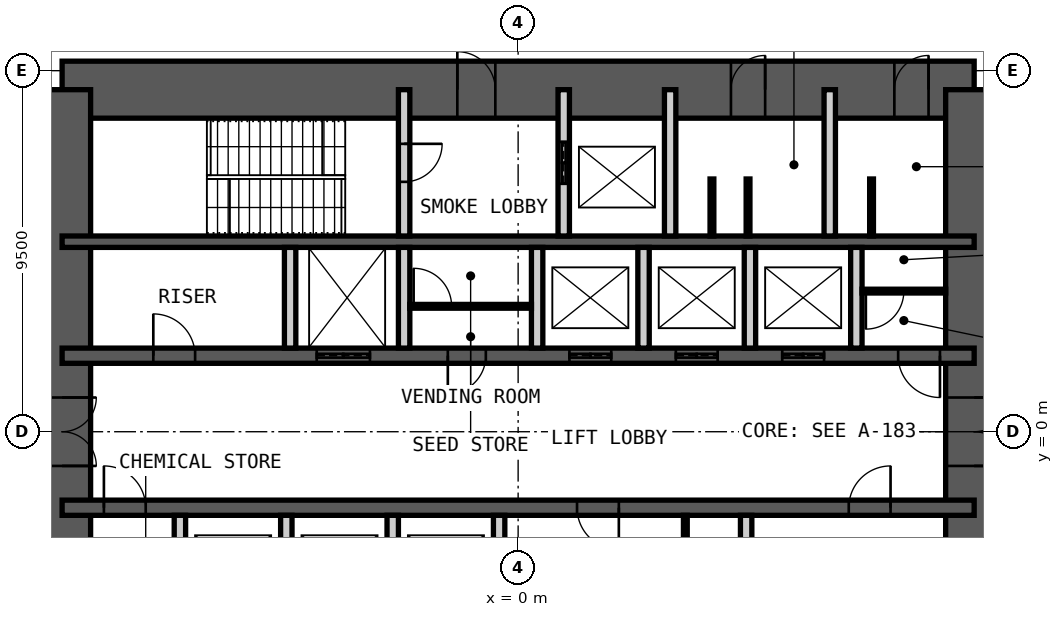
"""IFC4 building model, lengths in metres.
Left out: names, types, materials, properties, quantities, classifications, styles, units other than length and angle.
Written with IfcOpenShell. Run it as: python <this file> out.ifc"""

import sys

from ifc_helpers import new_model, si_unit, direction, frame, frame_2d, origin, place, context, subcontext, project, spatial, rectangle, extrude, element, fill, save


model = new_model("IFC4")
c1 = context("Model", 3, precision=1e-05, world=origin(), true_north=direction((0.0, 1.0)))
c2 = subcontext(c1, "Body", "Model", "MODEL_VIEW")
j1 = project(units=[si_unit("LENGTHUNIT", "METRE"), si_unit("PLANEANGLEUNIT", "RADIAN")], contexts=[c1])
p1 = place(None, origin())
s1 = spatial("IfcSite", under=j1, at=p1, CompositionType="ELEMENT")
p2 = place(p1, origin())
s2 = spatial("IfcBuilding", under=s1, at=p2, CompositionType="ELEMENT")
p3 = place(p2, frame((0.0, 0.0, 57.0)))
s3 = spatial("IfcBuildingStorey", under=s2, at=p3, CompositionType="ELEMENT", Elevation=57.0)
p4 = place(p3, frame((-12.0, 9.0, 0.0), z_axis=(0.0, 0.0, 1.0), x_axis=(1.0, 0.0, 0.0)))
e1 = element("IfcWall", 1, at=p4, inside=s3, PredefinedType="SHEAR", context=c2, shape_type="SweptSolid", body=[
    extrude(rectangle(XDim=24.0, YDim=1.5, at=frame_2d((12.0, 0.0))), origin(), (0.0, 0.0, 1.0), 5.0),
])
p5 = place(p4, frame((10.4, 0.0, 0.0)))
e2 = element("IfcOpeningElement", 2, at=p5, cuts=e1, PredefinedType="OPENING", context=c2, shape_type="SweptSolid", body=[
    extrude(rectangle(XDim=1.0, YDim=2.1, at=frame_2d((0.5, 1.05))), frame((0.0, 0.76, 0.0), z_axis=(0.0, -1.0, 0.0), x_axis=(1.0, 0.0, 0.0)), (0.0, 0.0, 1.0), 1.52),
])
p6 = place(p4, frame((17.6, 0.0, 0.0)))
e3 = element("IfcOpeningElement", 3, at=p6, cuts=e1, PredefinedType="OPENING", context=c2, shape_type="SweptSolid", body=[
    extrude(rectangle(XDim=0.9, YDim=2.1, at=frame_2d((0.45, 1.05))), frame((0.0, 0.76, 0.0), z_axis=(0.0, -1.0, 0.0), x_axis=(1.0, 0.0, 0.0)), (0.0, 0.0, 1.0), 1.52),
])
p7 = place(p4, frame((21.9, 0.0, 0.0)))
e4 = element("IfcOpeningElement", 4, at=p7, cuts=e1, PredefinedType="OPENING", context=c2, shape_type="SweptSolid", body=[
    extrude(rectangle(XDim=0.9, YDim=2.1, at=frame_2d((0.45, 1.05))), frame((0.0, 0.76, 0.0), z_axis=(0.0, -1.0, 0.0), x_axis=(1.0, 0.0, 0.0)), (0.0, 0.0, 1.0), 1.52),
])
p8 = place(p3, frame((12.0, -9.0, 0.0), z_axis=(0.0, 0.0, 1.0), x_axis=(0.0, 1.0, 0.0)))
e5 = element("IfcWall", 5, at=p8, inside=s3, PredefinedType="SHEAR", context=c2, shape_type="SweptSolid", body=[
    extrude(rectangle(XDim=18.0, YDim=1.5, at=frame_2d((9.0, 0.0))), origin(), (0.0, 0.0, 1.0), 5.0),
])
p9 = place(p8, frame((8.1, 0.0, 0.0)))
e6 = element("IfcOpeningElement", 6, at=p9, cuts=e5, PredefinedType="OPENING", context=c2, shape_type="SweptSolid", body=[
    extrude(rectangle(XDim=1.8, YDim=2.1, at=frame_2d((0.9, 1.05))), frame((0.0, 0.76, 0.0), z_axis=(0.0, -1.0, 0.0), x_axis=(1.0, 0.0, 0.0)), (0.0, 0.0, 1.0), 1.52),
])
p10 = place(p3, frame((-12.0, -9.0, 0.0), z_axis=(0.0, 0.0, 1.0), x_axis=(0.0, 1.0, 0.0)))
e7 = element("IfcWall", 7, at=p10, inside=s3, PredefinedType="SHEAR", context=c2, shape_type="SweptSolid", body=[
    extrude(rectangle(XDim=18.0, YDim=1.5, at=frame_2d((9.0, 0.0))), origin(), (0.0, 0.0, 1.0), 5.0),
])
p11 = place(p10, frame((8.1, 0.0, 0.0)))
e8 = element("IfcOpeningElement", 8, at=p11, cuts=e7, PredefinedType="OPENING", context=c2, shape_type="SweptSolid", body=[
    extrude(rectangle(XDim=1.8, YDim=2.1, at=frame_2d((0.9, 1.05))), frame((0.0, 0.76, 0.0), z_axis=(0.0, -1.0, 0.0), x_axis=(1.0, 0.0, 0.0)), (0.0, 0.0, 1.0), 1.52),
])
p12 = place(p3, frame((-12.0, 5.0, 0.0), z_axis=(0.0, 0.0, 1.0), x_axis=(1.0, 0.0, 0.0)))
e9 = element("IfcWall", 9, at=p12, inside=s3, PredefinedType="SHEAR", context=c2, shape_type="SweptSolid", body=[
    extrude(rectangle(XDim=24.0, YDim=0.3, at=frame_2d((12.0, 0.0))), origin(), (0.0, 0.0, 1.0), 5.0),
])
p13 = place(p3, frame((-12.0, 2.0, 0.0), z_axis=(0.0, 0.0, 1.0), x_axis=(1.0, 0.0, 0.0)))
e10 = element("IfcWall", 10, at=p13, inside=s3, PredefinedType="SHEAR", context=c2, shape_type="SweptSolid", body=[
    extrude(rectangle(XDim=24.0, YDim=0.4, at=frame_2d((12.0, 0.0))), origin(), (0.0, 0.0, 1.0), 5.0),
])
p14 = place(p13, frame((2.4, 0.0, 0.0)))
e11 = element("IfcOpeningElement", 11, at=p14, cuts=e10, PredefinedType="OPENING", context=c2, shape_type="SweptSolid", body=[
    extrude(rectangle(XDim=1.1, YDim=2.1, at=frame_2d((0.55, 1.05))), frame((0.0, 0.21, 0.0), z_axis=(0.0, -1.0, 0.0), x_axis=(1.0, 0.0, 0.0)), (0.0, 0.0, 1.0), 0.42),
])
p15 = place(p13, frame((22.0, 0.0, 0.0)))
e12 = element("IfcOpeningElement", 12, at=p15, cuts=e10, PredefinedType="OPENING", context=c2, shape_type="SweptSolid", body=[
    extrude(rectangle(XDim=1.1, YDim=2.1, at=frame_2d((0.55, 1.05))), frame((0.0, 0.21, 0.0), z_axis=(0.0, -1.0, 0.0), x_axis=(1.0, 0.0, 0.0)), (0.0, 0.0, 1.0), 0.42),
])
p16 = place(p13, frame((10.15, 0.0, 0.0)))
e13 = element("IfcOpeningElement", 13, at=p16, cuts=e10, PredefinedType="OPENING", context=c2, shape_type="SweptSolid", body=[
    extrude(rectangle(XDim=1.0, YDim=2.1, at=frame_2d((0.5, 1.05))), frame((0.0, 0.21, 0.0), z_axis=(0.0, -1.0, 0.0), x_axis=(1.0, 0.0, 0.0)), (0.0, 0.0, 1.0), 0.42),
])
p17 = place(p13, frame((6.7, 0.0, 0.0)))
e14 = element("IfcOpeningElement", 14, at=p17, cuts=e10, PredefinedType="OPENING", context=c2, shape_type="SweptSolid", body=[
    extrude(rectangle(XDim=1.4, YDim=2.4, at=frame_2d((0.7, 1.2))), frame((0.0, 0.21, 0.0), z_axis=(0.0, -1.0, 0.0), x_axis=(1.0, 0.0, 0.0)), (0.0, 0.0, 1.0), 0.42),
])
p18 = place(p13, frame((13.35, 0.0, 0.0)))
e15 = element("IfcOpeningElement", 15, at=p18, cuts=e10, PredefinedType="OPENING", context=c2, shape_type="SweptSolid", body=[
    extrude(rectangle(XDim=1.1, YDim=2.4, at=frame_2d((0.55, 1.2))), frame((0.0, 0.21, 0.0), z_axis=(0.0, -1.0, 0.0), x_axis=(1.0, 0.0, 0.0)), (0.0, 0.0, 1.0), 0.42),
])
p19 = place(p13, frame((16.15, 0.0, 0.0)))
e16 = element("IfcOpeningElement", 16, at=p19, cuts=e10, PredefinedType="OPENING", context=c2, shape_type="SweptSolid", body=[
    extrude(rectangle(XDim=1.1, YDim=2.4, at=frame_2d((0.55, 1.2))), frame((0.0, 0.21, 0.0), z_axis=(0.0, -1.0, 0.0), x_axis=(1.0, 0.0, 0.0)), (0.0, 0.0, 1.0), 0.42),
])
p20 = place(p13, frame((18.95, 0.0, 0.0)))
e17 = element("IfcOpeningElement", 17, at=p20, cuts=e10, PredefinedType="OPENING", context=c2, shape_type="SweptSolid", body=[
    extrude(rectangle(XDim=1.1, YDim=2.4, at=frame_2d((0.55, 1.2))), frame((0.0, 0.21, 0.0), z_axis=(0.0, -1.0, 0.0), x_axis=(1.0, 0.0, 0.0)), (0.0, 0.0, 1.0), 0.42),
])
p21 = place(p3, frame((-12.0, -2.0, 0.0), z_axis=(0.0, 0.0, 1.0), x_axis=(1.0, 0.0, 0.0)))
e18 = element("IfcWall", 18, at=p21, inside=s3, PredefinedType="SHEAR", context=c2, shape_type="SweptSolid", body=[
    extrude(rectangle(XDim=24.0, YDim=0.4, at=frame_2d((12.0, 0.0))), origin(), (0.0, 0.0, 1.0), 5.0),
])
p22 = place(p21, frame((1.1, 0.0, 0.0)))
e19 = element("IfcOpeningElement", 19, at=p22, cuts=e18, PredefinedType="OPENING", context=c2, shape_type="SweptSolid", body=[
    extrude(rectangle(XDim=1.1, YDim=2.1, at=frame_2d((0.55, 1.05))), frame((0.0, 0.21, 0.0), z_axis=(0.0, -1.0, 0.0), x_axis=(1.0, 0.0, 0.0)), (0.0, 0.0, 1.0), 0.42),
])
p23 = place(p21, frame((13.55, 0.0, 0.0)))
e20 = element("IfcOpeningElement", 20, at=p23, cuts=e18, PredefinedType="OPENING", context=c2, shape_type="SweptSolid", body=[
    extrude(rectangle(XDim=1.1, YDim=2.1, at=frame_2d((0.55, 1.05))), frame((0.0, 0.21, 0.0), z_axis=(0.0, -1.0, 0.0), x_axis=(1.0, 0.0, 0.0)), (0.0, 0.0, 1.0), 0.42),
])
p24 = place(p21, frame((20.7, 0.0, 0.0)))
e21 = element("IfcOpeningElement", 21, at=p24, cuts=e18, PredefinedType="OPENING", context=c2, shape_type="SweptSolid", body=[
    extrude(rectangle(XDim=1.1, YDim=2.1, at=frame_2d((0.55, 1.05))), frame((0.0, 0.21, 0.0), z_axis=(0.0, -1.0, 0.0), x_axis=(1.0, 0.0, 0.0)), (0.0, 0.0, 1.0), 0.42),
])
p25 = place(p3, frame((-3.0, 5.15, 0.0), z_axis=(0.0, 0.0, 1.0), x_axis=(0.0, 1.0, 0.0)))
e22 = element("IfcWall", 22, at=p25, inside=s3, PredefinedType="PARTITIONING", context=c2, shape_type="SweptSolid", body=[
    extrude(rectangle(XDim=3.85, YDim=0.3, at=frame_2d((1.925, 0.0))), origin(), (0.0, 0.0, 1.0), 4.78),
])
p26 = place(p25, frame((1.425, 0.0, 0.0)))
e23 = element("IfcOpeningElement", 23, at=p26, cuts=e22, PredefinedType="OPENING", context=c2, shape_type="SweptSolid", body=[
    extrude(rectangle(XDim=1.0, YDim=2.1, at=frame_2d((0.5, 1.05))), frame((0.0, 0.16, 0.0), z_axis=(0.0, -1.0, 0.0), x_axis=(1.0, 0.0, 0.0)), (0.0, 0.0, 1.0), 0.32),
])
p27 = place(p3, frame((1.2, 5.15, 0.0), z_axis=(0.0, 0.0, 1.0), x_axis=(0.0, 1.0, 0.0)))
e24 = element("IfcWall", 24, at=p27, inside=s3, PredefinedType="PARTITIONING", context=c2, shape_type="SweptSolid", body=[
    extrude(rectangle(XDim=3.85, YDim=0.3, at=frame_2d((1.925, 0.0))), origin(), (0.0, 0.0, 1.0), 4.78),
])
p28 = place(p27, frame((1.375, 0.0, 0.0)))
e25 = element("IfcOpeningElement", 25, at=p28, cuts=e24, PredefinedType="OPENING", context=c2, shape_type="SweptSolid", body=[
    extrude(rectangle(XDim=1.1, YDim=2.4, at=frame_2d((0.55, 1.2))), frame((0.0, 0.16, 0.0), z_axis=(0.0, -1.0, 0.0), x_axis=(1.0, 0.0, 0.0)), (0.0, 0.0, 1.0), 0.32),
])
for number, where, z_axis, x_axis in (
    (26, (4.0, 5.15, 0.0), (0.0, 0.0, 1.0), (0.0, 1.0, 0.0)),
    (27, (8.2, 5.15, 0.0), (0.0, 0.0, 1.0), (0.0, 1.0, 0.0)),
):
    element("IfcWall", number, at=place(p3, frame(where, z_axis=z_axis, x_axis=x_axis)), inside=s3, PredefinedType="PARTITIONING", context=c2, shape_type="SweptSolid", body=[
        extrude(rectangle(XDim=3.85, YDim=0.3, at=frame_2d((1.925, 0.0))), origin(), (0.0, 0.0, 1.0), 4.78),
    ])
for number, where, z_axis, x_axis in (
    (28, (-6.0, 2.2, 0.0), (0.0, 0.0, 1.0), (0.0, 1.0, 0.0)),
    (29, (-3.0, 2.2, 0.0), (0.0, 0.0, 1.0), (0.0, 1.0, 0.0)),
    (30, (0.5, 2.2, 0.0), (0.0, 0.0, 1.0), (0.0, 1.0, 0.0)),
    (31, (3.3, 2.2, 0.0), (0.0, 0.0, 1.0), (0.0, 1.0, 0.0)),
    (32, (6.1, 2.2, 0.0), (0.0, 0.0, 1.0), (0.0, 1.0, 0.0)),
    (33, (8.9, 2.2, 0.0), (0.0, 0.0, 1.0), (0.0, 1.0, 0.0)),
    (34, (-8.9, -4.85, 0.0), (0.0, 0.0, 1.0), (0.0, 1.0, 0.0)),
    (35, (-6.1, -4.85, 0.0), (0.0, 0.0, 1.0), (0.0, 1.0, 0.0)),
    (36, (-3.3, -4.85, 0.0), (0.0, 0.0, 1.0), (0.0, 1.0, 0.0)),
    (37, (-0.5, -4.85, 0.0), (0.0, 0.0, 1.0), (0.0, 1.0, 0.0)),
    (38, (6.0, -4.85, 0.0), (0.0, 0.0, 1.0), (0.0, 1.0, 0.0)),
):
    element("IfcWall", number, at=place(p3, frame(where, z_axis=z_axis, x_axis=x_axis)), inside=s3, PredefinedType="PARTITIONING", context=c2, shape_type="SweptSolid", body=[
        extrude(rectangle(XDim=2.65, YDim=0.3, at=frame_2d((1.325, 0.0))), origin(), (0.0, 0.0, 1.0), 4.78),
    ])
p29 = place(p3, frame((-2.85, 3.3, 0.0), z_axis=(0.0, 0.0, 1.0), x_axis=(1.0, 0.0, 0.0)))
e39 = element("IfcWall", 39, at=p29, inside=s3, PredefinedType="PARTITIONING", context=c2, shape_type="SweptSolid", body=[
    extrude(rectangle(XDim=3.2, YDim=0.1, at=frame_2d((1.6, 0.0))), origin(), (0.0, 0.0, 1.0), 4.78),
])
p30 = place(p29, frame((0.1, 0.0, 0.0)))
e40 = element("IfcOpeningElement", 40, at=p30, cuts=e39, PredefinedType="OPENING", context=c2, shape_type="SweptSolid", body=[
    extrude(rectangle(XDim=1.0, YDim=2.4, at=frame_2d((0.5, 1.2))), frame((0.0, 0.06, 0.0), z_axis=(0.0, -1.0, 0.0), x_axis=(1.0, 0.0, 0.0)), (0.0, 0.0, 1.0), 0.12),
])
p31 = place(p3, frame((4.4, -4.85, 0.0), z_axis=(0.0, 0.0, 1.0), x_axis=(0.0, 1.0, 0.0)))
e41 = element("IfcWall", 41, at=p31, inside=s3, PredefinedType="PARTITIONING", context=c2, shape_type="SweptSolid", body=[
    extrude(rectangle(XDim=2.65, YDim=0.1, at=frame_2d((1.325, 0.0))), origin(), (0.0, 0.0, 1.0), 4.78),
])
p32 = place(p31, frame((0.1, 0.0, 0.0)))
e42 = element("IfcOpeningElement", 42, at=p32, cuts=e41, PredefinedType="OPENING", context=c2, shape_type="SweptSolid", body=[
    extrude(rectangle(XDim=1.0, YDim=2.4, at=frame_2d((0.5, 1.2))), frame((0.0, 0.06, 0.0), z_axis=(0.0, -1.0, 0.0), x_axis=(1.0, 0.0, 0.0)), (0.0, 0.0, 1.0), 0.12),
])
p33 = place(p3, frame((9.05, 3.7, 0.0), z_axis=(0.0, 0.0, 1.0), x_axis=(1.0, 0.0, 0.0)))
e43 = element("IfcWall", 43, at=p33, inside=s3, PredefinedType="PARTITIONING", context=c2, shape_type="SweptSolid", body=[
    extrude(rectangle(XDim=2.2, YDim=0.1, at=frame_2d((1.1, 0.0))), origin(), (0.0, 0.0, 1.0), 4.78),
])
p34 = place(p33, frame((0.1, 0.0, 0.0)))
e44 = element("IfcOpeningElement", 44, at=p34, cuts=e43, PredefinedType="OPENING", context=c2, shape_type="SweptSolid", body=[
    extrude(rectangle(XDim=1.0, YDim=2.4, at=frame_2d((0.5, 1.2))), frame((0.0, 0.06, 0.0), z_axis=(0.0, -1.0, 0.0), x_axis=(1.0, 0.0, 0.0)), (0.0, 0.0, 1.0), 0.12),
])
for number, where, z_axis, x_axis in (
    (45, (5.1, 5.15, 0.0), (0.0, 0.0, 1.0), (0.0, 1.0, 0.0)),
    (46, (6.05, 5.15, 0.0), (0.0, 0.0, 1.0), (0.0, 1.0, 0.0)),
    (47, (9.3, 5.15, 0.0), (0.0, 0.0, 1.0), (0.0, 1.0, 0.0)),
):
    element("IfcWall", number, at=place(p3, frame(where, z_axis=z_axis, x_axis=x_axis)), inside=s3, PredefinedType="PARTITIONING", context=c2, shape_type="SweptSolid", body=[
        extrude(rectangle(XDim=1.5, YDim=0.1, at=frame_2d((0.75, 0.0))), origin(), (0.0, 0.0, 1.0), 2.1),
    ])
p35 = place(p5, origin())
e48 = element("IfcDoor", 48, at=p35, inside=s3, OperationType="SINGLE_SWING_RIGHT", PredefinedType="DOOR", context=c2, shape_type="SweptSolid", body=[
    extrude(rectangle(XDim=1.0, YDim=2.1, at=frame_2d((0.5, 1.05))), frame((0.0, 0.025, 0.0), z_axis=(0.0, -1.0, 0.0), x_axis=(1.0, 0.0, 0.0)), (0.0, 0.0, 1.0), 0.05),
])
fill(e2, e48)
p36 = place(p6, origin())
e49 = element("IfcDoor", 49, at=p36, inside=s3, OperationType="SINGLE_SWING_LEFT", PredefinedType="DOOR", context=c2, shape_type="SweptSolid", body=[
    extrude(rectangle(XDim=0.9, YDim=2.1, at=frame_2d((0.45, 1.05))), frame((0.0, 0.025, 0.0), z_axis=(0.0, -1.0, 0.0), x_axis=(1.0, 0.0, 0.0)), (0.0, 0.0, 1.0), 0.05),
])
fill(e3, e49)
p37 = place(p7, origin())
e50 = element("IfcDoor", 50, at=p37, inside=s3, OperationType="SINGLE_SWING_LEFT", PredefinedType="DOOR", context=c2, shape_type="SweptSolid", body=[
    extrude(rectangle(XDim=0.9, YDim=2.1, at=frame_2d((0.45, 1.05))), frame((0.0, 0.025, 0.0), z_axis=(0.0, -1.0, 0.0), x_axis=(1.0, 0.0, 0.0)), (0.0, 0.0, 1.0), 0.05),
])
fill(e4, e50)
p38 = place(p26, origin())
e51 = element("IfcDoor", 51, at=p38, inside=s3, OperationType="SINGLE_SWING_RIGHT", PredefinedType="DOOR", context=c2, shape_type="SweptSolid", body=[
    extrude(rectangle(XDim=1.0, YDim=2.1, at=frame_2d((0.5, 1.05))), frame((0.0, 0.025, 0.0), z_axis=(0.0, -1.0, 0.0), x_axis=(1.0, 0.0, 0.0)), (0.0, 0.0, 1.0), 0.05),
])
fill(e23, e51)
p39 = place(p14, origin())
e52 = element("IfcDoor", 52, at=p39, inside=s3, OperationType="SINGLE_SWING_RIGHT", PredefinedType="DOOR", context=c2, shape_type="SweptSolid", body=[
    extrude(rectangle(XDim=1.1, YDim=2.1, at=frame_2d((0.55, 1.05))), frame((0.0, 0.025, 0.0), z_axis=(0.0, -1.0, 0.0), x_axis=(1.0, 0.0, 0.0)), (0.0, 0.0, 1.0), 0.05),
])
fill(e11, e52)
p40 = place(p22, origin())
e53 = element("IfcDoor", 53, at=p40, inside=s3, OperationType="SINGLE_SWING_RIGHT", PredefinedType="DOOR", context=c2, shape_type="SweptSolid", body=[
    extrude(rectangle(XDim=1.1, YDim=2.1, at=frame_2d((0.55, 1.05))), frame((0.0, 0.025, 0.0), z_axis=(0.0, -1.0, 0.0), x_axis=(1.0, 0.0, 0.0)), (0.0, 0.0, 1.0), 0.05),
])
fill(e19, e53)
p41 = place(p15, origin())
e54 = element("IfcDoor", 54, at=p41, inside=s3, OperationType="SINGLE_SWING_RIGHT", PredefinedType="DOOR", context=c2, shape_type="SweptSolid", body=[
    extrude(rectangle(XDim=1.1, YDim=2.1, at=frame_2d((0.55, 1.05))), frame((0.0, 0.025, 0.0), z_axis=(0.0, -1.0, 0.0), x_axis=(1.0, 0.0, 0.0)), (0.0, 0.0, 1.0), 0.05),
])
fill(e12, e54)
p42 = place(p16, origin())
e55 = element("IfcDoor", 55, at=p42, inside=s3, OperationType="SINGLE_SWING_LEFT", PredefinedType="DOOR", context=c2, shape_type="SweptSolid", body=[
    extrude(rectangle(XDim=1.0, YDim=2.1, at=frame_2d((0.5, 1.05))), frame((0.0, 0.025, 0.0), z_axis=(0.0, -1.0, 0.0), x_axis=(1.0, 0.0, 0.0)), (0.0, 0.0, 1.0), 0.05),
])
fill(e13, e55)
p43 = place(p23, origin())
e56 = element("IfcDoor", 56, at=p43, inside=s3, OperationType="SINGLE_SWING_RIGHT", PredefinedType="DOOR", context=c2, shape_type="SweptSolid", body=[
    extrude(rectangle(XDim=1.1, YDim=2.1, at=frame_2d((0.55, 1.05))), frame((0.0, 0.025, 0.0), z_axis=(0.0, -1.0, 0.0), x_axis=(1.0, 0.0, 0.0)), (0.0, 0.0, 1.0), 0.05),
])
fill(e20, e56)
p44 = place(p24, origin())
e57 = element("IfcDoor", 57, at=p44, inside=s3, OperationType="SINGLE_SWING_LEFT", PredefinedType="DOOR", context=c2, shape_type="SweptSolid", body=[
    extrude(rectangle(XDim=1.1, YDim=2.1, at=frame_2d((0.55, 1.05))), frame((0.0, 0.025, 0.0), z_axis=(0.0, -1.0, 0.0), x_axis=(1.0, 0.0, 0.0)), (0.0, 0.0, 1.0), 0.05),
])
fill(e21, e57)
p45 = place(p9, origin())
e58 = element("IfcDoor", 58, at=p45, inside=s3, OperationType="DOUBLE_DOOR_DOUBLE_SWING", PredefinedType="DOOR", context=c2, shape_type="SweptSolid", body=[
    extrude(rectangle(XDim=1.8, YDim=2.1, at=frame_2d((0.9, 1.05))), frame((0.0, 0.025, 0.0), z_axis=(0.0, -1.0, 0.0), x_axis=(1.0, 0.0, 0.0)), (0.0, 0.0, 1.0), 0.05),
])
fill(e6, e58)
p46 = place(p11, origin())
e59 = element("IfcDoor", 59, at=p46, inside=s3, OperationType="DOUBLE_DOOR_DOUBLE_SWING", PredefinedType="DOOR", context=c2, shape_type="SweptSolid", body=[
    extrude(rectangle(XDim=1.8, YDim=2.1, at=frame_2d((0.9, 1.05))), frame((0.0, 0.025, 0.0), z_axis=(0.0, -1.0, 0.0), x_axis=(1.0, 0.0, 0.0)), (0.0, 0.0, 1.0), 0.05),
])
fill(e8, e59)
p47 = place(p28, origin())
e60 = element("IfcDoor", 60, at=p47, inside=s3, OperationType="DOUBLE_DOOR_SLIDING", PredefinedType="DOOR", context=c2, shape_type="SweptSolid", body=[
    extrude(rectangle(XDim=1.1, YDim=2.4, at=frame_2d((0.55, 1.2))), frame((0.0, 0.025, 0.0), z_axis=(0.0, -1.0, 0.0), x_axis=(1.0, 0.0, 0.0)), (0.0, 0.0, 1.0), 0.05),
])
fill(e25, e60)
p48 = place(p17, origin())
e61 = element("IfcDoor", 61, at=p48, inside=s3, OperationType="DOUBLE_DOOR_SLIDING", PredefinedType="DOOR", context=c2, shape_type="SweptSolid", body=[
    extrude(rectangle(XDim=1.4, YDim=2.4, at=frame_2d((0.7, 1.2))), frame((0.0, 0.025, 0.0), z_axis=(0.0, -1.0, 0.0), x_axis=(1.0, 0.0, 0.0)), (0.0, 0.0, 1.0), 0.05),
])
fill(e14, e61)
p49 = place(p18, origin())
e62 = element("IfcDoor", 62, at=p49, inside=s3, OperationType="DOUBLE_DOOR_SLIDING", PredefinedType="DOOR", context=c2, shape_type="SweptSolid", body=[
    extrude(rectangle(XDim=1.1, YDim=2.4, at=frame_2d((0.55, 1.2))), frame((0.0, 0.025, 0.0), z_axis=(0.0, -1.0, 0.0), x_axis=(1.0, 0.0, 0.0)), (0.0, 0.0, 1.0), 0.05),
])
fill(e15, e62)
p50 = place(p19, origin())
e63 = element("IfcDoor", 63, at=p50, inside=s3, OperationType="DOUBLE_DOOR_SLIDING", PredefinedType="DOOR", context=c2, shape_type="SweptSolid", body=[
    extrude(rectangle(XDim=1.1, YDim=2.4, at=frame_2d((0.55, 1.2))), frame((0.0, 0.025, 0.0), z_axis=(0.0, -1.0, 0.0), x_axis=(1.0, 0.0, 0.0)), (0.0, 0.0, 1.0), 0.05),
])
fill(e16, e63)
p51 = place(p20, origin())
e64 = element("IfcDoor", 64, at=p51, inside=s3, OperationType="DOUBLE_DOOR_SLIDING", PredefinedType="DOOR", context=c2, shape_type="SweptSolid", body=[
    extrude(rectangle(XDim=1.1, YDim=2.4, at=frame_2d((0.55, 1.2))), frame((0.0, 0.025, 0.0), z_axis=(0.0, -1.0, 0.0), x_axis=(1.0, 0.0, 0.0)), (0.0, 0.0, 1.0), 0.05),
])
fill(e17, e64)
p52 = place(p30, origin())
e65 = element("IfcDoor", 65, at=p52, inside=s3, OperationType="SINGLE_SWING_RIGHT", PredefinedType="DOOR", context=c2, shape_type="SweptSolid", body=[
    extrude(rectangle(XDim=1.0, YDim=2.4, at=frame_2d((0.5, 1.2))), frame((0.0, 0.025, 0.0), z_axis=(0.0, -1.0, 0.0), x_axis=(1.0, 0.0, 0.0)), (0.0, 0.0, 1.0), 0.05),
])
fill(e40, e65)
p53 = place(p34, origin())
e66 = element("IfcDoor", 66, at=p53, inside=s3, OperationType="SINGLE_SWING_LEFT", PredefinedType="DOOR", context=c2, shape_type="SweptSolid", body=[
    extrude(rectangle(XDim=1.0, YDim=2.4, at=frame_2d((0.5, 1.2))), frame((0.0, 0.025, 0.0), z_axis=(0.0, -1.0, 0.0), x_axis=(1.0, 0.0, 0.0)), (0.0, 0.0, 1.0), 0.05),
])
fill(e44, e66)
save(model, sys.argv[1])
